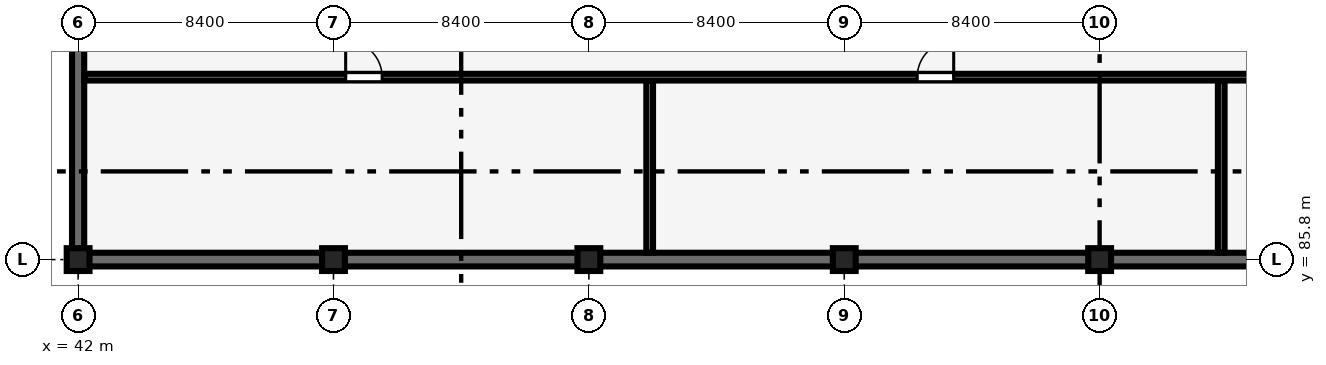
"""IFC4 building model, lengths in metres.
Left out: names, types, materials, properties, quantities, classifications, styles, units other than length and angle.
Written with IfcOpenShell. Run it as: python <this file> out.ifc"""

import sys

from ifc_helpers import new_model, si_unit, direction, frame, frame_2d, origin, origin_2d, place, context, subcontext, project, spatial, rectangle, extrude, element, fill, save


model = new_model("IFC4")
c1 = context("Model", 3, precision=1e-05, world=origin(), true_north=direction((0.0, 1.0)))
c2 = subcontext(c1, "Body", "Model", "MODEL_VIEW")
j1 = project(units=[si_unit("LENGTHUNIT", "METRE"), si_unit("PLANEANGLEUNIT", "RADIAN")], contexts=[c1])
p1 = place(None, origin())
s1 = spatial("IfcSite", under=j1, at=p1, CompositionType="ELEMENT")
p2 = place(p1, origin())
s2 = spatial("IfcBuilding", under=s1, at=p2, CompositionType="ELEMENT")
p3 = place(p2, frame((0.0, 0.0, -4.2)))
s3 = spatial("IfcBuildingStorey", under=s2, at=p3, CompositionType="ELEMENT", Elevation=-4.2)
for number, where, z_axis, x_axis in (
    (1, (42.0, 85.8, 0.0), (0.0, 0.0, 1.0), (1.0, 0.0, 0.0)),
    (2, (50.4, 85.8, 0.0), (0.0, 0.0, 1.0), (1.0, 0.0, 0.0)),
    (3, (58.8, 85.8, 0.0), (0.0, 0.0, 1.0), (1.0, 0.0, 0.0)),
    (4, (67.2, 85.8, 0.0), (0.0, 0.0, 1.0), (1.0, 0.0, 0.0)),
    (5, (75.6, 85.8, 0.0), (0.0, 0.0, 1.0), (1.0, 0.0, 0.0)),
):
    element("IfcColumn", number, at=place(p3, frame(where, z_axis=z_axis, x_axis=x_axis)), inside=s3, PredefinedType="COLUMN", context=c2, shape_type="SweptSolid", body=[
        extrude(rectangle(XDim=0.75, YDim=0.75, at=origin_2d()), origin(), (0.0, 0.0, 1.0), 4.2),
    ])
p4 = place(p3, frame((42.0, 86.15, 0.0), z_axis=(0.0, 0.0, 1.0), x_axis=(0.0, 1.0, 0.0)))
e6 = element("IfcWall", 6, at=p4, inside=s3, PredefinedType="SHEAR", context=c2, shape_type="SweptSolid", body=[
    extrude(rectangle(XDim=8.3, YDim=0.4, at=frame_2d((4.15, 0.0))), origin(), (0.0, 0.0, 1.0), 3.0),
])
p5 = place(p3, frame((42.35, 85.8, 0.0), z_axis=(0.0, 0.0, 1.0), x_axis=(1.0, 0.0, 0.0)))
e7 = element("IfcWall", 7, at=p5, inside=s3, PredefinedType="SHEAR", context=c2, shape_type="SweptSolid", body=[
    extrude(rectangle(XDim=7.7, YDim=0.45, at=frame_2d((3.85, 0.0))), origin(), (0.0, 0.0, 1.0), 3.2),
])
p6 = place(p3, frame((50.75, 85.8, 0.0), z_axis=(0.0, 0.0, 1.0), x_axis=(1.0, 0.0, 0.0)))
e8 = element("IfcWall", 8, at=p6, inside=s3, PredefinedType="SHEAR", context=c2, shape_type="SweptSolid", body=[
    extrude(rectangle(XDim=7.7, YDim=0.45, at=frame_2d((3.85, 0.0))), origin(), (0.0, 0.0, 1.0), 3.15),
])
p7 = place(p3, frame((59.15, 85.8, 0.0), z_axis=(0.0, 0.0, 1.0), x_axis=(1.0, 0.0, 0.0)))
e9 = element("IfcWall", 9, at=p7, inside=s3, PredefinedType="SHEAR", context=c2, shape_type="SweptSolid", body=[
    extrude(rectangle(XDim=7.7, YDim=0.45, at=frame_2d((3.85, 0.0))), origin(), (0.0, 0.0, 1.0), 3.2),
])
p8 = place(p3, frame((67.55, 85.8, 0.0), z_axis=(0.0, 0.0, 1.0), x_axis=(1.0, 0.0, 0.0)))
e10 = element("IfcWall", 10, at=p8, inside=s3, PredefinedType="SHEAR", context=c2, shape_type="SweptSolid", body=[
    extrude(rectangle(XDim=7.7, YDim=0.45, at=frame_2d((3.85, 0.0))), origin(), (0.0, 0.0, 1.0), 3.15),
])
p9 = place(p3, frame((75.95, 85.8, 0.0), z_axis=(0.0, 0.0, 1.0), x_axis=(1.0, 0.0, 0.0)))
e11 = element("IfcWall", 11, at=p9, inside=s3, PredefinedType="SHEAR", context=c2, shape_type="SweptSolid", body=[
    extrude(rectangle(XDim=7.7, YDim=0.45, at=frame_2d((3.85, 0.0))), origin(), (0.0, 0.0, 1.0), 3.1),
])
for number, where, z_axis, x_axis in (
    (12, (60.8, 86.03, 0.0), (0.0, 0.0, 1.0), (0.0, 1.0, 0.0)),
    (13, (79.6, 86.03, 0.0), (0.0, 0.0, 1.0), (0.0, 1.0, 0.0)),
):
    element("IfcWall", number, at=place(p3, frame(where, z_axis=z_axis, x_axis=x_axis)), inside=s3, PredefinedType="SOLIDWALL", context=c2, shape_type="SweptSolid", body=[
        extrude(rectangle(XDim=5.655, YDim=0.22, at=frame_2d((2.828, 0.0))), origin(), (0.0, 0.0, 1.0), 3.9),
    ])
p10 = place(p3, frame((42.205, 91.8, 0.0), z_axis=(0.0, 0.0, 1.0), x_axis=(1.0, 0.0, 0.0)))
e14 = element("IfcWall", 14, at=p10, inside=s3, PredefinedType="SOLIDWALL", context=c2, shape_type="SweptSolid", body=[
    extrude(rectangle(XDim=55.985, YDim=0.22, at=frame_2d((27.992, 0.0))), origin(), (0.0, 0.0, 1.0), 3.9),
])
p11 = place(p10, frame((8.595, 0.0, 0.0)))
e15 = element("IfcOpeningElement", 15, at=p11, cuts=e14, PredefinedType="OPENING", context=c2, shape_type="SweptSolid", body=[
    extrude(rectangle(XDim=1.2, YDim=2.4, at=frame_2d((0.6, 1.2))), frame((0.0, 0.12, 0.0), z_axis=(0.0, -1.0, 0.0), x_axis=(1.0, 0.0, 0.0)), (0.0, 0.0, 1.0), 0.24),
])
p12 = place(p10, frame((27.395, 0.0, 0.0)))
e16 = element("IfcOpeningElement", 16, at=p12, cuts=e14, PredefinedType="OPENING", context=c2, shape_type="SweptSolid", body=[
    extrude(rectangle(XDim=1.2, YDim=2.4, at=frame_2d((0.6, 1.2))), frame((0.0, 0.12, 0.0), z_axis=(0.0, -1.0, 0.0), x_axis=(1.0, 0.0, 0.0)), (0.0, 0.0, 1.0), 0.24),
])
p13 = place(p10, frame((46.095, 0.0, 0.0)))
e17 = element("IfcOpeningElement", 17, at=p13, cuts=e14, PredefinedType="OPENING", context=c2, shape_type="SweptSolid", body=[
    extrude(rectangle(XDim=1.2, YDim=2.4, at=frame_2d((0.6, 1.2))), frame((0.0, 0.12, 0.0), z_axis=(0.0, -1.0, 0.0), x_axis=(1.0, 0.0, 0.0)), (0.0, 0.0, 1.0), 0.24),
])
p14 = place(p11, origin())
e18 = element("IfcDoor", 18, at=p14, inside=s3, OperationType="SINGLE_SWING_LEFT", PredefinedType="DOOR", context=c2, shape_type="SweptSolid", body=[
    extrude(rectangle(XDim=1.2, YDim=2.4, at=frame_2d((0.6, 1.2))), frame((0.0, 0.025, 0.0), z_axis=(0.0, -1.0, 0.0), x_axis=(1.0, 0.0, 0.0)), (0.0, 0.0, 1.0), 0.05),
])
fill(e15, e18)
p15 = place(p12, origin())
e19 = element("IfcDoor", 19, at=p15, inside=s3, OperationType="SINGLE_SWING_RIGHT", PredefinedType="DOOR", context=c2, shape_type="SweptSolid", body=[
    extrude(rectangle(XDim=1.2, YDim=2.4, at=frame_2d((0.6, 1.2))), frame((0.0, 0.025, 0.0), z_axis=(0.0, -1.0, 0.0), x_axis=(1.0, 0.0, 0.0)), (0.0, 0.0, 1.0), 0.05),
])
fill(e16, e19)
save(model, sys.argv[1])
